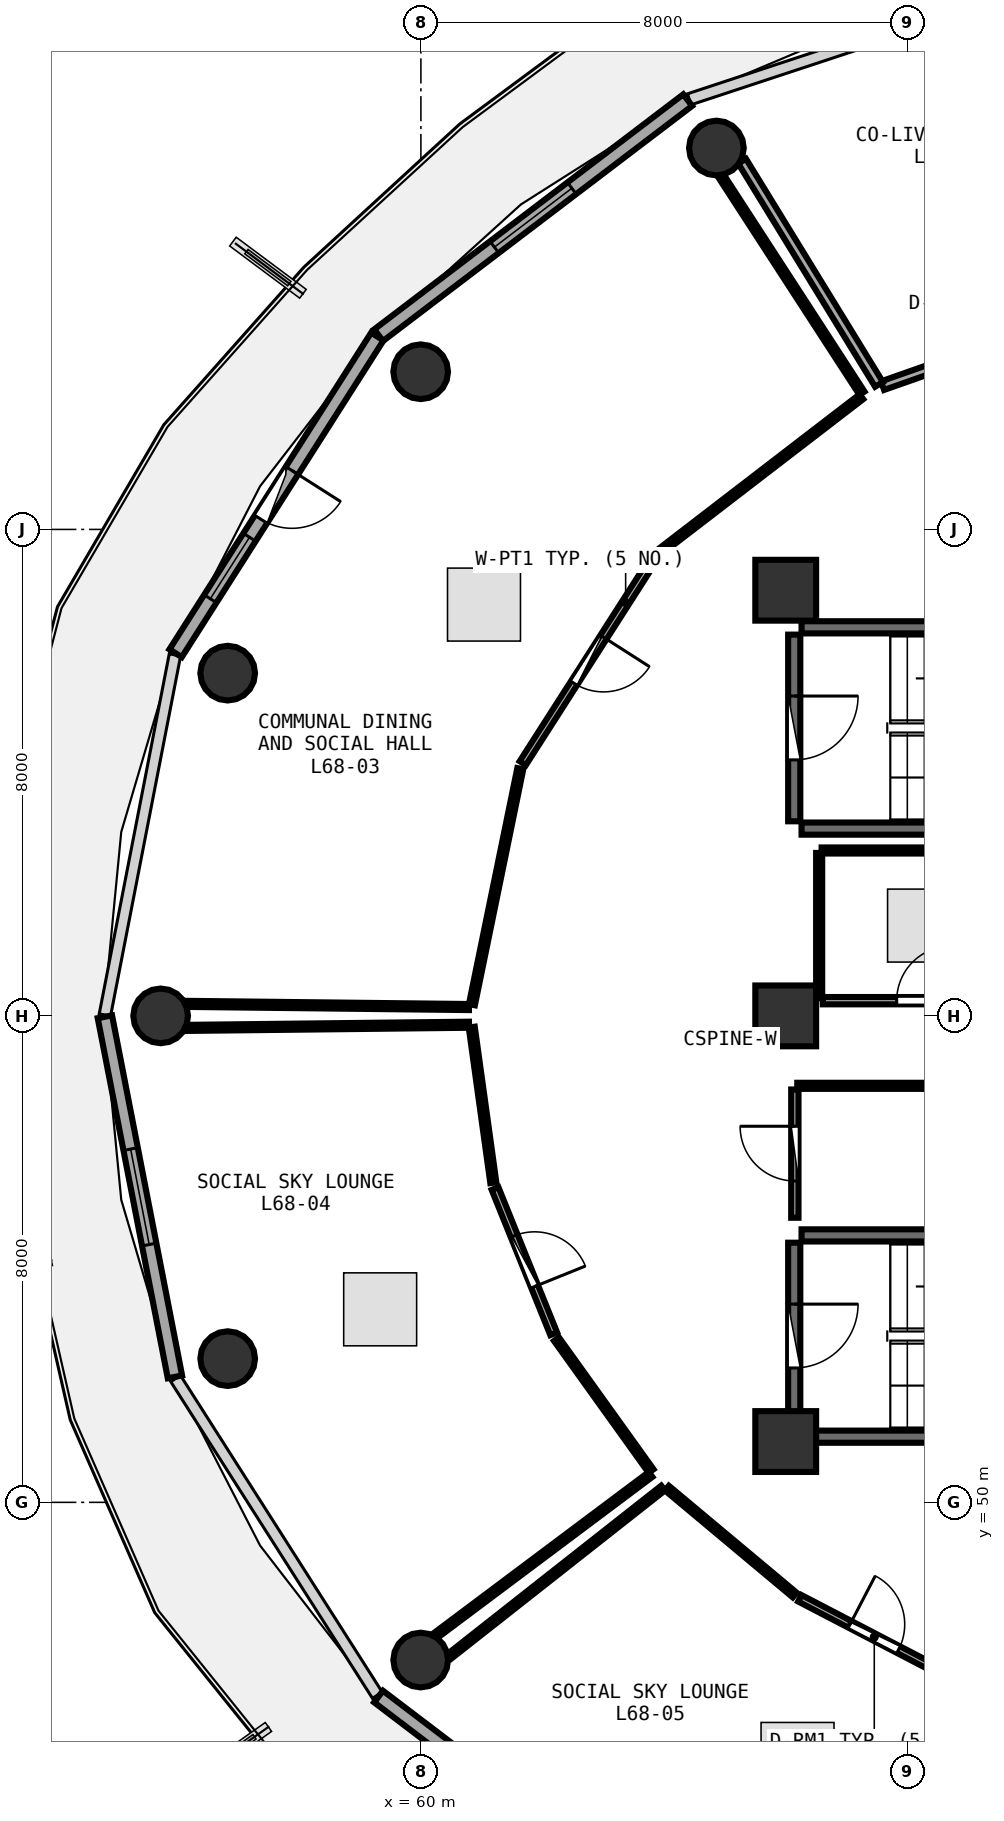
"""IFC4 building model, lengths in metres.
Left out: names, types, materials, properties, quantities, classifications, styles, units other than length and angle.
Written with IfcOpenShell. Run it as: python <this file> out.ifc"""

import sys

from ifc_helpers import new_model, si_unit, direction, frame, frame_2d, origin, origin_2d, place, context, subcontext, project, spatial, rectangle, circle, extrude, element, fill, save


model = new_model("IFC4")
c1 = context("Model", 3, precision=1e-05, world=origin(), true_north=direction((0.0, 1.0)))
c2 = subcontext(c1, "Body", "Model", "MODEL_VIEW")
j1 = project(units=[si_unit("LENGTHUNIT", "METRE"), si_unit("PLANEANGLEUNIT", "RADIAN")], contexts=[c1])
p1 = place(None, origin())
s1 = spatial("IfcSite", under=j1, at=p1, CompositionType="ELEMENT")
p2 = place(p1, origin())
s2 = spatial("IfcBuilding", under=s1, at=p2, CompositionType="ELEMENT")
p3 = place(p2, frame((0.0, 0.0, 267.45)))
s3 = spatial("IfcBuildingStorey", under=s2, at=p3, CompositionType="ELEMENT", Elevation=267.45)
for number, where, z_axis, x_axis in (
    (1, (66.0, 51.0, 0.0), (0.0, 0.0, 1.0), (1.0, 0.0, 0.0)),
    (2, (66.0, 65.0, 0.0), (0.0, 0.0, 1.0), (1.0, 0.0, 0.0)),
    (3, (66.0, 58.0, 0.0), (0.0, 0.0, 1.0), (1.0, 0.0, 0.0)),
):
    element("IfcColumn", number, at=place(p3, frame(where, z_axis=z_axis, x_axis=x_axis)), inside=s3, PredefinedType="PILASTER", context=c2, shape_type="SweptSolid", body=[
        extrude(rectangle(XDim=1.0, YDim=1.0, at=origin_2d()), origin(), (0.0, 0.0, 1.0), 3.75),
    ])
for number, where, z_axis, x_axis in (
    (4, (64.86, 72.272, 0.0), (0.0, 0.0, 1.0), (1.0, 0.0, 0.0)),
    (5, (59.997, 68.593, 0.0), (0.0, 0.0, 1.0), (1.0, 0.0, 0.0)),
    (6, (56.823, 63.636, 0.0), (0.0, 0.0, 1.0), (1.0, 0.0, 0.0)),
    (7, (55.72, 58.0, 0.0), (0.0, 0.0, 1.0), (1.0, 0.0, 0.0)),
    (8, (56.823, 52.364, 0.0), (0.0, 0.0, 1.0), (1.0, 0.0, 0.0)),
    (9, (59.997, 47.407, 0.0), (0.0, 0.0, 1.0), (1.0, 0.0, 0.0)),
):
    element("IfcColumn", number, at=place(p3, frame(where, z_axis=z_axis, x_axis=x_axis)), inside=s3, PredefinedType="COLUMN", context=c2, shape_type="SweptSolid", body=[
        extrude(circle(Radius=0.45, at=origin_2d()), origin(), (0.0, 0.0, 1.0), 3.75),
    ])
p4 = place(p3, frame((64.388, 73.06, 0.0), z_axis=(0.0, 0.0, 1.0), x_axis=(-0.796010444211, -0.605282886514, 0.0)))
e10 = element("IfcWall", 10, at=p4, inside=s3, PredefinedType="SOLIDWALL", context=c2, shape_type="SweptSolid", body=[
    extrude(rectangle(XDim=6.387, YDim=0.24, at=frame_2d((3.194, 0.0))), origin(), (0.0, 0.0, 1.0), 3.475),
])
p5 = place(p4, frame((2.394, 0.0, 0.85)))
e11 = element("IfcOpeningElement", 11, at=p5, cuts=e10, PredefinedType="OPENING", context=c2, shape_type="SweptSolid", body=[
    extrude(rectangle(XDim=1.6, YDim=1.45, at=frame_2d((0.8, 0.725))), frame((0.0, 0.13, 0.0), z_axis=(0.0, -1.0, 0.0), x_axis=(1.0, 0.0, 0.0)), (0.0, 0.0, 1.0), 0.26),
])
p6 = place(p3, frame((59.284, 69.172, 0.0), z_axis=(0.0, 0.0, 1.0), x_axis=(-0.537271968456, -0.843409053728, 0.0)))
e12 = element("IfcWall", 12, at=p6, inside=s3, PredefinedType="SOLIDWALL", context=c2, shape_type="SweptSolid", body=[
    extrude(rectangle(XDim=6.175, YDim=0.24, at=frame_2d((3.087, 0.0))), origin(), (0.0, 0.0, 1.0), 3.475),
])
p7 = place(p6, frame((2.613, 0.0, 0.0)))
e13 = element("IfcOpeningElement", 13, at=p7, cuts=e12, PredefinedType="OPENING", context=c2, shape_type="SweptSolid", body=[
    extrude(rectangle(XDim=0.95, YDim=2.1, at=frame_2d((0.475, 1.05))), frame((0.0, 0.13, 0.0), z_axis=(0.0, -1.0, 0.0), x_axis=(1.0, 0.0, 0.0)), (0.0, 0.0, 1.0), 0.26),
])
p8 = place(p6, frame((3.913, 0.0, 0.85)))
e14 = element("IfcOpeningElement", 14, at=p8, cuts=e12, PredefinedType="OPENING", context=c2, shape_type="SweptSolid", body=[
    extrude(rectangle(XDim=1.2, YDim=1.45, at=frame_2d((0.6, 0.725))), frame((0.0, 0.13, 0.0), z_axis=(0.0, -1.0, 0.0), x_axis=(1.0, 0.0, 0.0)), (0.0, 0.0, 1.0), 0.26),
])
p9 = place(p3, frame((54.803, 57.985, 0.0), z_axis=(0.0, 0.0, 1.0), x_axis=(0.190969309115, -0.981596008028, 0.0)))
e15 = element("IfcWall", 15, at=p9, inside=s3, PredefinedType="SOLIDWALL", context=c2, shape_type="SweptSolid", body=[
    extrude(rectangle(XDim=6.033, YDim=0.24, at=frame_2d((3.017, 0.0))), origin(), (0.0, 0.0, 1.0), 3.475),
])
p10 = place(p9, frame((2.216, 0.0, 0.85)))
e16 = element("IfcOpeningElement", 16, at=p10, cuts=e15, PredefinedType="OPENING", context=c2, shape_type="SweptSolid", body=[
    extrude(rectangle(XDim=1.6, YDim=1.45, at=frame_2d((0.8, 0.725))), frame((0.0, 0.13, 0.0), z_axis=(0.0, -1.0, 0.0), x_axis=(1.0, 0.0, 0.0)), (0.0, 0.0, 1.0), 0.26),
])
p11 = place(p3, frame((59.304, 46.806, 0.0), z_axis=(0.0, 0.0, 1.0), x_axis=(0.796010444211, -0.605282886514, 0.0)))
e17 = element("IfcWall", 17, at=p11, inside=s3, PredefinedType="SOLIDWALL", context=c2, shape_type="SweptSolid", body=[
    extrude(rectangle(XDim=6.387, YDim=0.24, at=frame_2d((3.194, 0.0))), origin(), (0.0, 0.0, 1.0), 3.475),
])
p12 = place(p11, frame((2.394, 0.0, 0.85)))
e18 = element("IfcOpeningElement", 18, at=p12, cuts=e17, PredefinedType="OPENING", context=c2, shape_type="SweptSolid", body=[
    extrude(rectangle(XDim=1.6, YDim=1.45, at=frame_2d((0.8, 0.725))), frame((0.0, 0.13, 0.0), z_axis=(0.0, -1.0, 0.0), x_axis=(1.0, 0.0, 0.0)), (0.0, 0.0, 1.0), 0.26),
])
for number, where, z_axis, x_axis in (
    (19, (66.26, 61.08, 0.0), (0.0, 0.0, 1.0), (1.0, 0.0, 0.0)),
    (20, (73.42, 64.39, 0.0), (0.0, 0.0, 1.0), (-1.0, 0.0, 0.0)),
):
    element("IfcWall", number, at=place(p3, frame(where, z_axis=z_axis, x_axis=x_axis)), inside=s3, PredefinedType="SHEAR", context=c2, shape_type="SweptSolid", body=[
        extrude(rectangle(XDim=7.16, YDim=0.2, at=frame_2d((3.58, 0.0))), origin(), (0.0, 0.0, 1.0), 3.49),
    ])
p13 = place(p3, frame((66.14, 64.27, 0.0), z_axis=(0.0, 0.0, 1.0), x_axis=(0.0, -1.0, 0.0)))
e21 = element("IfcWall", 21, at=p13, inside=s3, PredefinedType="SHEAR", context=c2, shape_type="SweptSolid", body=[
    extrude(rectangle(XDim=3.07, YDim=0.2, at=frame_2d((1.535, 0.0))), origin(), (0.0, 0.0, 1.0), 3.49),
])
p14 = place(p13, frame((1.01, 0.0, 0.0)))
e22 = element("IfcOpeningElement", 22, at=p14, cuts=e21, PredefinedType="OPENING", context=c2, shape_type="SweptSolid", body=[
    extrude(rectangle(XDim=1.05, YDim=2.1, at=frame_2d((0.525, 1.05))), frame((0.0, 0.11, 0.0), z_axis=(0.0, -1.0, 0.0), x_axis=(1.0, 0.0, 0.0)), (0.0, 0.0, 1.0), 0.22),
])
for number, where, z_axis, x_axis in (
    (23, (66.26, 51.08, 0.0), (0.0, 0.0, 1.0), (1.0, 0.0, 0.0)),
    (24, (73.42, 54.39, 0.0), (0.0, 0.0, 1.0), (-1.0, 0.0, 0.0)),
):
    element("IfcWall", number, at=place(p3, frame(where, z_axis=z_axis, x_axis=x_axis)), inside=s3, PredefinedType="SHEAR", context=c2, shape_type="SweptSolid", body=[
        extrude(rectangle(XDim=7.16, YDim=0.2, at=frame_2d((3.58, 0.0))), origin(), (0.0, 0.0, 1.0), 3.49),
    ])
p15 = place(p3, frame((66.14, 54.27, 0.0), z_axis=(0.0, 0.0, 1.0), x_axis=(0.0, -1.0, 0.0)))
e25 = element("IfcWall", 25, at=p15, inside=s3, PredefinedType="SHEAR", context=c2, shape_type="SweptSolid", body=[
    extrude(rectangle(XDim=3.07, YDim=0.2, at=frame_2d((1.535, 0.0))), origin(), (0.0, 0.0, 1.0), 3.49),
])
p16 = place(p15, frame((1.01, 0.0, 0.0)))
e26 = element("IfcOpeningElement", 26, at=p16, cuts=e25, PredefinedType="OPENING", context=c2, shape_type="SweptSolid", body=[
    extrude(rectangle(XDim=1.05, YDim=2.1, at=frame_2d((0.525, 1.05))), frame((0.0, 0.11, 0.0), z_axis=(0.0, -1.0, 0.0), x_axis=(1.0, 0.0, 0.0)), (0.0, 0.0, 1.0), 0.22),
])
p17 = place(p3, frame((66.61, 58.25, 0.0), z_axis=(0.0, 0.0, 1.0), x_axis=(1.0, 0.0, 0.0)))
e27 = element("IfcWall", 27, at=p17, inside=s3, PredefinedType="PARTITIONING", context=c2, shape_type="SweptSolid", body=[
    extrude(rectangle(XDim=3.33, YDim=0.12, at=frame_2d((1.665, 0.0))), origin(), (0.0, 0.0, 1.0), 3.48),
])
p18 = place(p17, frame((1.215, 0.0, 0.0)))
e28 = element("IfcOpeningElement", 28, at=p18, cuts=e27, PredefinedType="OPENING", context=c2, shape_type="SweptSolid", body=[
    extrude(rectangle(XDim=0.9, YDim=2.08, at=frame_2d((0.45, 1.04))), frame((0.0, 0.07, 0.0), z_axis=(0.0, -1.0, 0.0), x_axis=(1.0, 0.0, 0.0)), (0.0, 0.0, 1.0), 0.14),
])
p19 = place(p3, frame((66.15, 54.68, 0.0), z_axis=(0.0, 0.0, 1.0), x_axis=(0.0, 1.0, 0.0)))
e29 = element("IfcWall", 29, at=p19, inside=s3, PredefinedType="PARTITIONING", context=c2, shape_type="SweptSolid", body=[
    extrude(rectangle(XDim=2.11, YDim=0.12, at=frame_2d((1.055, 0.0))), origin(), (0.0, 0.0, 1.0), 2.775),
])
p20 = place(p19, frame((0.605, 0.0, 0.0)))
e30 = element("IfcOpeningElement", 30, at=p20, cuts=e29, PredefinedType="OPENING", context=c2, shape_type="SweptSolid", body=[
    extrude(rectangle(XDim=0.9, YDim=2.08, at=frame_2d((0.45, 1.04))), frame((0.0, 0.07, 0.0), z_axis=(0.0, -1.0, 0.0), x_axis=(1.0, 0.0, 0.0)), (0.0, 0.0, 1.0), 0.14),
])
p21 = place(p3, frame((63.844, 65.542, 0.0), z_axis=(0.0, 0.0, 1.0), x_axis=(-0.539324099435, -0.842098281538, 0.0)))
e31 = element("IfcWall", 31, at=p21, inside=s3, PredefinedType="PARTITIONING", context=c2, shape_type="SweptSolid", body=[
    extrude(rectangle(XDim=4.022, YDim=0.12, at=frame_2d((2.011, 0.0))), origin(), (0.0, 0.0, 1.0), 3.075),
])
p22 = place(p21, frame((1.561, 0.0, 0.0)))
e32 = element("IfcOpeningElement", 32, at=p22, cuts=e31, PredefinedType="OPENING", context=c2, shape_type="SweptSolid", body=[
    extrude(rectangle(XDim=0.9, YDim=2.08, at=frame_2d((0.45, 1.04))), frame((0.0, 0.07, 0.0), z_axis=(0.0, -1.0, 0.0), x_axis=(1.0, 0.0, 0.0)), (0.0, 0.0, 1.0), 0.14),
])
p23 = place(p3, frame((61.219, 55.16, 0.0), z_axis=(0.0, 0.0, 1.0), x_axis=(0.374574284654, -0.927196907499, 0.0)))
e33 = element("IfcWall", 33, at=p23, inside=s3, PredefinedType="PARTITIONING", context=c2, shape_type="SweptSolid", body=[
    extrude(rectangle(XDim=2.576, YDim=0.12, at=frame_2d((1.288, 0.0))), origin(), (0.0, 0.0, 1.0), 3.48),
])
p24 = place(p23, frame((0.838, 0.0, 0.0)))
e34 = element("IfcOpeningElement", 34, at=p24, cuts=e33, PredefinedType="OPENING", context=c2, shape_type="SweptSolid", body=[
    extrude(rectangle(XDim=0.9, YDim=2.08, at=frame_2d((0.45, 1.04))), frame((0.0, 0.07, 0.0), z_axis=(0.0, -1.0, 0.0), x_axis=(1.0, 0.0, 0.0)), (0.0, 0.0, 1.0), 0.14),
])
p25 = place(p3, frame((66.232, 48.422, 0.0), z_axis=(0.0, 0.0, 1.0), x_axis=(0.887021247279, -0.461728607382, 0.0)))
e35 = element("IfcWall", 35, at=p25, inside=s3, PredefinedType="PARTITIONING", context=c2, shape_type="SweptSolid", body=[
    extrude(rectangle(XDim=2.761, YDim=0.12, at=frame_2d((1.38, 0.0))), origin(), (0.0, 0.0, 1.0), 3.235),
])
p26 = place(p25, frame((0.93, 0.0, 0.0)))
e36 = element("IfcOpeningElement", 36, at=p26, cuts=e35, PredefinedType="OPENING", context=c2, shape_type="SweptSolid", body=[
    extrude(rectangle(XDim=0.9, YDim=2.08, at=frame_2d((0.45, 1.04))), frame((0.0, 0.07, 0.0), z_axis=(0.0, -1.0, 0.0), x_axis=(1.0, 0.0, 0.0)), (0.0, 0.0, 1.0), 0.14),
])
p27 = place(p3, frame((69.96, 60.72, 0.0), z_axis=(0.0, 0.0, 1.0), x_axis=(-1.0, 0.0, 0.0)))
e37 = element("IfcWall", 37, at=p27, inside=s3, PredefinedType="PARTITIONING", context=c2, shape_type="SweptSolid", body=[
    extrude(rectangle(XDim=3.37, YDim=0.1, at=frame_2d((1.685, 0.0))), origin(), (0.0, 0.0, 1.0), 3.48),
])
p28 = place(p3, frame((66.55, 60.68, 0.0), z_axis=(0.0, 0.0, 1.0), x_axis=(0.0, -1.0, 0.0)))
e38 = element("IfcWall", 38, at=p28, inside=s3, PredefinedType="PARTITIONING", context=c2, shape_type="SweptSolid", body=[
    extrude(rectangle(XDim=2.39, YDim=0.1, at=frame_2d((1.195, 0.0))), origin(), (0.0, 0.0, 1.0), 3.48),
])
p29 = place(p3, frame((71.76, 56.85, 0.0), z_axis=(0.0, 0.0, 1.0), x_axis=(-1.0, 0.0, 0.0)))
e39 = element("IfcWall", 39, at=p29, inside=s3, PredefinedType="PARTITIONING", context=c2, shape_type="SweptSolid", body=[
    extrude(rectangle(XDim=5.57, YDim=0.1, at=frame_2d((2.785, 0.0))), origin(), (0.0, 0.0, 1.0), 2.775),
])
p30 = place(p3, frame((70.928, 69.538, 0.0), z_axis=(0.0, 0.0, 1.0), x_axis=(-0.943334007166, -0.331844769319, 0.0)))
e40 = element("IfcWall", 40, at=p30, inside=s3, PredefinedType="PARTITIONING", context=c2, shape_type="SweptSolid", body=[
    extrude(rectangle(XDim=3.536, YDim=0.15, at=frame_2d((1.768, 0.0))), origin(), (0.0, 0.0, 1.0), 3.48),
])
p31 = place(p3, frame((67.534, 68.385, 0.0), z_axis=(0.0, 0.0, 1.0), x_axis=(-0.522784059663, 0.852465147066, 0.0)))
e41 = element("IfcWall", 41, at=p31, inside=s3, PredefinedType="PARTITIONING", context=c2, shape_type="SweptSolid", body=[
    extrude(rectangle(XDim=4.306, YDim=0.15, at=frame_2d((2.153, 0.0))), origin(), (0.0, 0.0, 1.0), 3.175),
])
p32 = place(p3, frame((67.244, 68.182, 0.0), z_axis=(0.0, 0.0, 1.0), x_axis=(-0.792820246885, -0.609455540733, 0.0)))
e42 = element("IfcWall", 42, at=p32, inside=s3, PredefinedType="PARTITIONING", context=c2, shape_type="SweptSolid", body=[
    extrude(rectangle(XDim=4.207, YDim=0.1, at=frame_2d((2.104, 0.0))), origin(), (0.0, 0.0, 1.0), 3.075),
])
p33 = place(p3, frame((61.635, 62.066, 0.0), z_axis=(0.0, 0.0, 1.0), x_axis=(-0.200853183429, -0.979621354762, 0.0)))
e43 = element("IfcWall", 43, at=p33, inside=s3, PredefinedType="PARTITIONING", context=c2, shape_type="SweptSolid", body=[
    extrude(rectangle(XDim=3.963, YDim=0.1, at=frame_2d((1.981, 0.0))), origin(), (0.0, 0.0, 1.0), 3.48),
])
p34 = place(p3, frame((60.791, 58.146, 0.0), z_axis=(0.0, 0.0, 1.0), x_axis=(-0.999937174585, 0.01120923205, 0.0)))
e44 = element("IfcWall", 44, at=p34, inside=s3, PredefinedType="PARTITIONING", context=c2, shape_type="SweptSolid", body=[
    extrude(rectangle(XDim=4.639, YDim=0.1, at=frame_2d((2.32, 0.0))), origin(), (0.0, 0.0, 1.0), 3.075),
])
p35 = place(p3, frame((64.942, 71.804, 0.0), z_axis=(0.0, 0.0, 1.0), x_axis=(0.544234825024, -0.838932926539, 0.0)))
e45 = element("IfcWall", 45, at=p35, inside=s3, PredefinedType="PARTITIONING", context=c2, shape_type="SweptSolid", body=[
    extrude(rectangle(XDim=4.249, YDim=0.1, at=frame_2d((2.125, 0.0))), origin(), (0.0, 0.0, 1.0), 3.075),
])
p36 = place(p3, frame((60.836, 57.815, 0.0), z_axis=(0.0, 0.0, 1.0), x_axis=(0.137359832701, -0.990521214493, 0.0)))
e46 = element("IfcWall", 46, at=p36, inside=s3, PredefinedType="PARTITIONING", context=c2, shape_type="SweptSolid", body=[
    extrude(rectangle(XDim=2.584, YDim=0.1, at=frame_2d((1.292, 0.0))), origin(), (0.0, 0.0, 1.0), 3.48),
])
p37 = place(p3, frame((62.23, 52.684, 0.0), z_axis=(0.0, 0.0, 1.0), x_axis=(0.582725386778, -0.812669135383, 0.0)))
e47 = element("IfcWall", 47, at=p37, inside=s3, PredefinedType="PARTITIONING", context=c2, shape_type="SweptSolid", body=[
    extrude(rectangle(XDim=2.669, YDim=0.1, at=frame_2d((1.334, 0.0))), origin(), (0.0, 0.0, 1.0), 3.075),
])
p38 = place(p3, frame((63.777, 50.458, 0.0), z_axis=(0.0, 0.0, 1.0), x_axis=(-0.800384816546, -0.599486568191, 0.0)))
e48 = element("IfcWall", 48, at=p38, inside=s3, PredefinedType="PARTITIONING", context=c2, shape_type="SweptSolid", body=[
    extrude(rectangle(XDim=4.414, YDim=0.1, at=frame_2d((2.207, 0.0))), origin(), (0.0, 0.0, 1.0), 3.175),
])
p39 = place(p3, frame((56.152, 57.802, 0.0), z_axis=(0.0, 0.0, 1.0), x_axis=(0.999937174585, 0.01120923205, 0.0)))
e49 = element("IfcWall", 49, at=p39, inside=s3, PredefinedType="PARTITIONING", context=c2, shape_type="SweptSolid", body=[
    extrude(rectangle(XDim=4.639, YDim=0.1, at=frame_2d((2.32, 0.0))), origin(), (0.0, 0.0, 1.0), 3.075),
])
p40 = place(p3, frame((64.046, 50.234, 0.0), z_axis=(0.0, 0.0, 1.0), x_axis=(0.767022676895, -0.641619991216, 0.0)))
e50 = element("IfcWall", 50, at=p40, inside=s3, PredefinedType="PARTITIONING", context=c2, shape_type="SweptSolid", body=[
    extrude(rectangle(XDim=2.741, YDim=0.1, at=frame_2d((1.371, 0.0))), origin(), (0.0, 0.0, 1.0), 3.075),
])
p41 = place(p3, frame((60.468, 47.468, 0.0), z_axis=(0.0, 0.0, 1.0), x_axis=(0.785736749878, 0.618561039745, 0.0)))
e51 = element("IfcWall", 51, at=p41, inside=s3, PredefinedType="PARTITIONING", context=c2, shape_type="SweptSolid", body=[
    extrude(rectangle(XDim=4.475, YDim=0.1, at=frame_2d((2.237, 0.0))), origin(), (0.0, 0.0, 1.0), 3.075),
])
p42 = place(p5, origin())
e52 = element("IfcWindow", 52, at=p42, inside=s3, PartitioningType="SINGLE_PANEL", PredefinedType="WINDOW", context=c2, shape_type="SweptSolid", body=[
    extrude(rectangle(XDim=1.6, YDim=1.45, at=frame_2d((0.8, 0.725))), frame((0.0, 0.03, 0.0), z_axis=(0.0, -1.0, 0.0), x_axis=(1.0, 0.0, 0.0)), (0.0, 0.0, 1.0), 0.06),
])
fill(e11, e52)
p43 = place(p7, frame((0.95, 0.0, 0.0), z_axis=(0.0, 0.0, 1.0), x_axis=(-1.0, 0.0, 0.0)))
e53 = element("IfcDoor", 53, at=p43, inside=s3, OperationType="SINGLE_SWING_RIGHT", PredefinedType="DOOR", context=c2, shape_type="SweptSolid", body=[
    extrude(rectangle(XDim=0.95, YDim=2.1, at=frame_2d((0.475, 1.05))), frame((0.0, 0.025, 0.0), z_axis=(0.0, -1.0, 0.0), x_axis=(1.0, 0.0, 0.0)), (0.0, 0.0, 1.0), 0.05),
])
fill(e13, e53)
p44 = place(p8, origin())
e54 = element("IfcWindow", 54, at=p44, inside=s3, PartitioningType="SINGLE_PANEL", PredefinedType="WINDOW", context=c2, shape_type="SweptSolid", body=[
    extrude(rectangle(XDim=1.2, YDim=1.45, at=frame_2d((0.6, 0.725))), frame((0.0, 0.03, 0.0), z_axis=(0.0, -1.0, 0.0), x_axis=(1.0, 0.0, 0.0)), (0.0, 0.0, 1.0), 0.06),
])
fill(e14, e54)
p45 = place(p10, origin())
e55 = element("IfcWindow", 55, at=p45, inside=s3, PartitioningType="SINGLE_PANEL", PredefinedType="WINDOW", context=c2, shape_type="SweptSolid", body=[
    extrude(rectangle(XDim=1.6, YDim=1.45, at=frame_2d((0.8, 0.725))), frame((0.0, 0.03, 0.0), z_axis=(0.0, -1.0, 0.0), x_axis=(1.0, 0.0, 0.0)), (0.0, 0.0, 1.0), 0.06),
])
fill(e16, e55)
p46 = place(p14, origin())
e56 = element("IfcDoor", 56, at=p46, inside=s3, OperationType="SINGLE_SWING_LEFT", PredefinedType="DOOR", context=c2, shape_type="SweptSolid", body=[
    extrude(rectangle(XDim=1.05, YDim=2.1, at=frame_2d((0.525, 1.05))), frame((0.0, 0.025, 0.0), z_axis=(0.0, -1.0, 0.0), x_axis=(1.0, 0.0, 0.0)), (0.0, 0.0, 1.0), 0.05),
])
fill(e22, e56)
p47 = place(p16, origin())
e57 = element("IfcDoor", 57, at=p47, inside=s3, OperationType="SINGLE_SWING_LEFT", PredefinedType="DOOR", context=c2, shape_type="SweptSolid", body=[
    extrude(rectangle(XDim=1.05, YDim=2.1, at=frame_2d((0.525, 1.05))), frame((0.0, 0.025, 0.0), z_axis=(0.0, -1.0, 0.0), x_axis=(1.0, 0.0, 0.0)), (0.0, 0.0, 1.0), 0.05),
])
fill(e26, e57)
p48 = place(p18, origin())
e58 = element("IfcDoor", 58, at=p48, inside=s3, OperationType="SINGLE_SWING_RIGHT", PredefinedType="DOOR", context=c2, shape_type="SweptSolid", body=[
    extrude(rectangle(XDim=0.9, YDim=2.08, at=frame_2d((0.45, 1.04))), frame((0.0, 0.025, 0.0), z_axis=(0.0, -1.0, 0.0), x_axis=(1.0, 0.0, 0.0)), (0.0, 0.0, 1.0), 0.05),
])
fill(e28, e58)
p49 = place(p20, origin())
e59 = element("IfcDoor", 59, at=p49, inside=s3, OperationType="SINGLE_SWING_RIGHT", PredefinedType="DOOR", context=c2, shape_type="SweptSolid", body=[
    extrude(rectangle(XDim=0.9, YDim=2.08, at=frame_2d((0.45, 1.04))), frame((0.0, 0.025, 0.0), z_axis=(0.0, -1.0, 0.0), x_axis=(1.0, 0.0, 0.0)), (0.0, 0.0, 1.0), 0.05),
])
fill(e30, e59)
p50 = place(p22, origin())
e60 = element("IfcDoor", 60, at=p50, inside=s3, OperationType="SINGLE_SWING_LEFT", PredefinedType="DOOR", context=c2, shape_type="SweptSolid", body=[
    extrude(rectangle(XDim=0.9, YDim=2.08, at=frame_2d((0.45, 1.04))), frame((0.0, 0.025, 0.0), z_axis=(0.0, -1.0, 0.0), x_axis=(1.0, 0.0, 0.0)), (0.0, 0.0, 1.0), 0.05),
])
fill(e32, e60)
p51 = place(p24, origin())
e61 = element("IfcDoor", 61, at=p51, inside=s3, OperationType="SINGLE_SWING_RIGHT", PredefinedType="DOOR", context=c2, shape_type="SweptSolid", body=[
    extrude(rectangle(XDim=0.9, YDim=2.08, at=frame_2d((0.45, 1.04))), frame((0.0, 0.025, 0.0), z_axis=(0.0, -1.0, 0.0), x_axis=(1.0, 0.0, 0.0)), (0.0, 0.0, 1.0), 0.05),
])
fill(e34, e61)
p52 = place(p26, origin())
e62 = element("IfcDoor", 62, at=p52, inside=s3, OperationType="SINGLE_SWING_LEFT", PredefinedType="DOOR", context=c2, shape_type="SweptSolid", body=[
    extrude(rectangle(XDim=0.9, YDim=2.08, at=frame_2d((0.45, 1.04))), frame((0.0, 0.025, 0.0), z_axis=(0.0, -1.0, 0.0), x_axis=(1.0, 0.0, 0.0)), (0.0, 0.0, 1.0), 0.05),
])
fill(e36, e62)
save(model, sys.argv[1])
